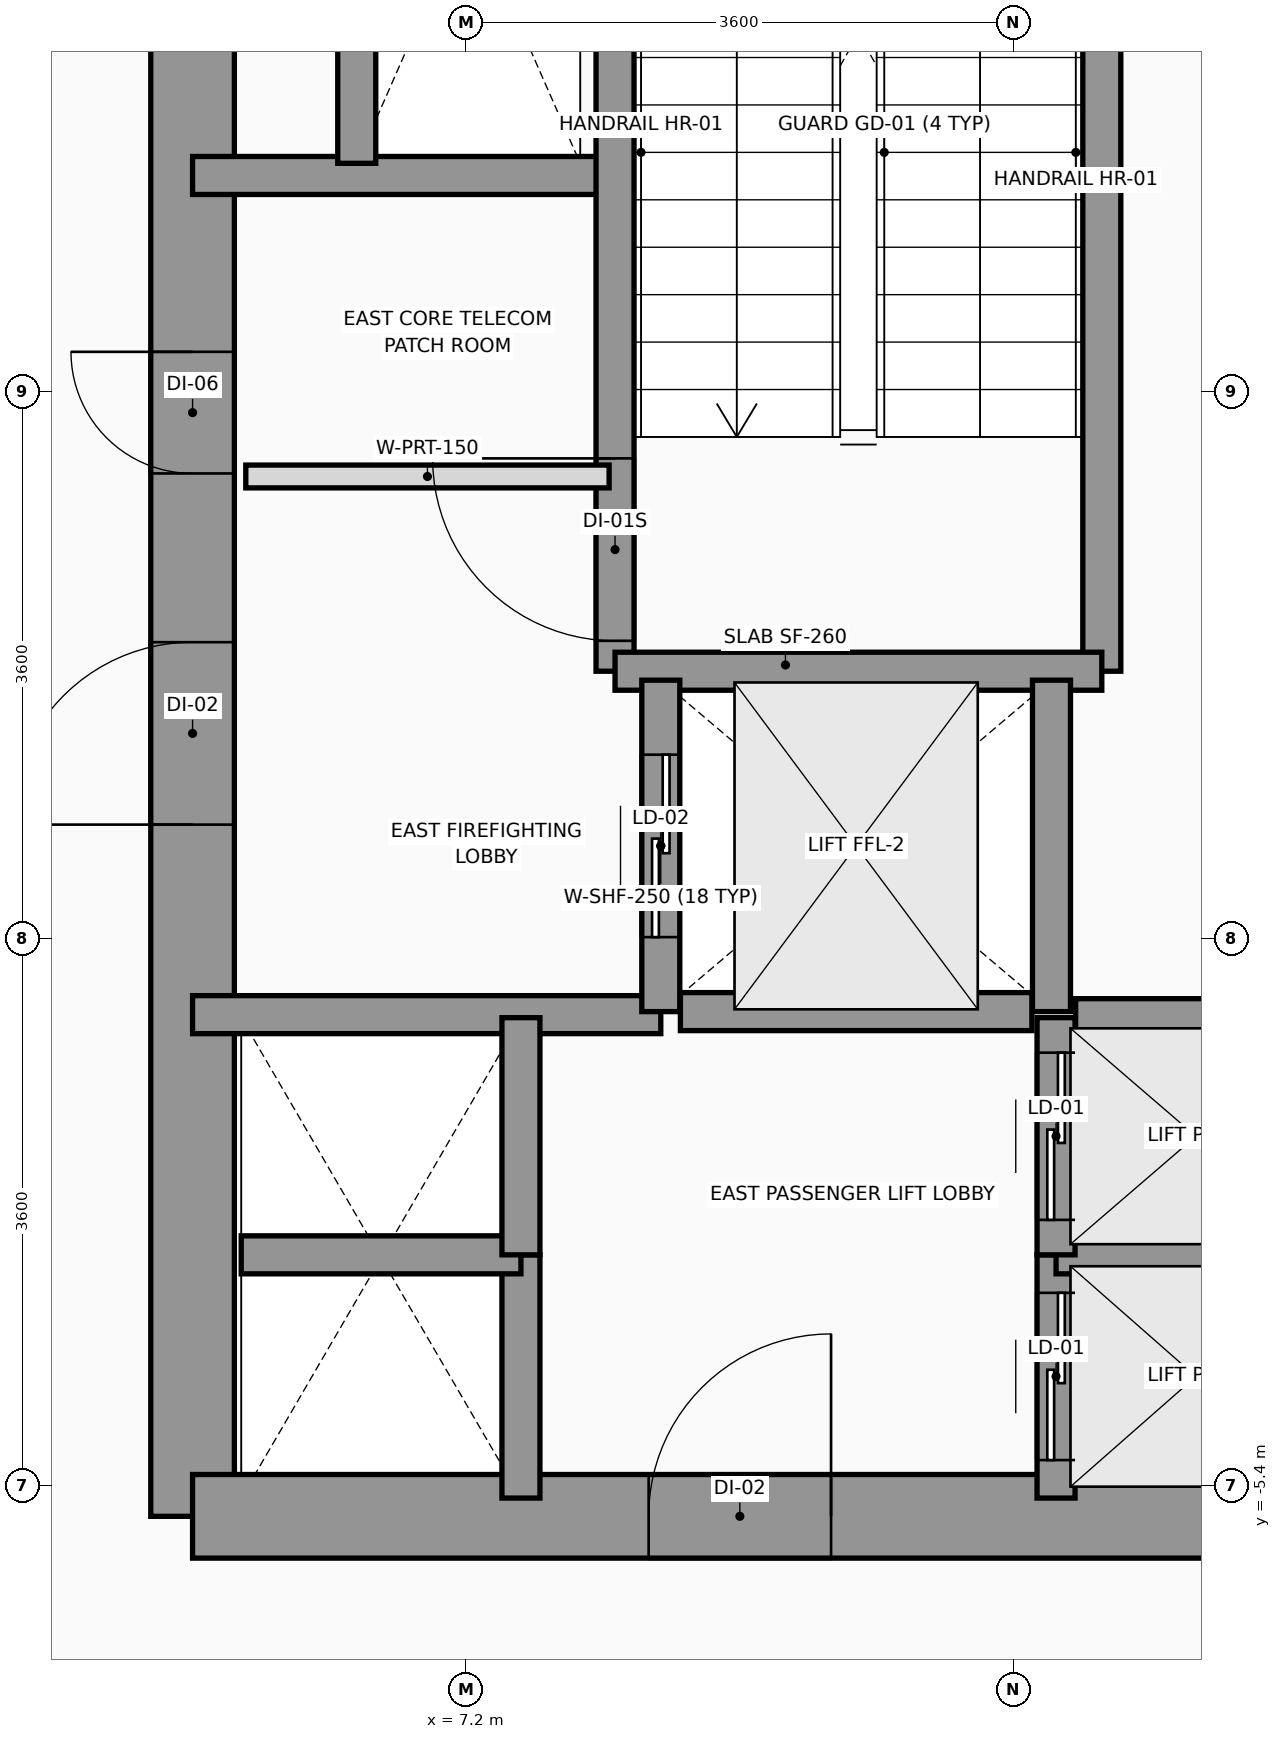
"""IFC4 building model, lengths in metres.
Left out: names, types, materials, properties, quantities, classifications, styles, units other than length and angle.
Written with IfcOpenShell. Run it as: python <this file> out.ifc"""

import sys

from ifc_helpers import new_model, si_unit, direction, frame, frame_2d, origin, place, context, subcontext, project, spatial, rectangle, extrude, source, transform, mapped, element, fill, save


model = new_model("IFC4")
c1 = context("Model", 3, precision=1e-05, world=origin(), true_north=direction((0.0, 1.0)))
c2 = subcontext(c1, "Body", "Model", "MODEL_VIEW")
j1 = project(units=[si_unit("LENGTHUNIT", "METRE"), si_unit("PLANEANGLEUNIT", "RADIAN")], contexts=[c1])
p1 = place(None, origin())
s1 = spatial("IfcSite", under=j1, at=p1, CompositionType="ELEMENT")
p2 = place(p1, origin())
s2 = spatial("IfcBuilding", under=s1, at=p2, CompositionType="ELEMENT")
p3 = place(p2, frame((0.0, 0.0, 88.4)))
s3 = spatial("IfcBuildingStorey", under=s2, at=p3, CompositionType="ELEMENT", Elevation=88.4)
p4 = place(p3, frame((5.4, -5.6, 0.0), z_axis=(0.0, 0.0, 1.0), x_axis=(0.0, 1.0, 0.0)))
e1 = element("IfcWall", 1, at=p4, inside=s3, PredefinedType="SHEAR", context=c2, shape_type="SweptSolid", body=[
    extrude(rectangle(XDim=12.5, YDim=0.55, at=frame_2d((6.25, 0.0))), origin(), (0.0, 0.0, 1.0), 4.4),
])
p5 = place(p4, frame((4.55, 0.0, 0.0)))
e2 = element("IfcOpeningElement", 2, at=p5, cuts=e1, PredefinedType="OPENING", context=c2, shape_type="SweptSolid", body=[
    extrude(rectangle(XDim=1.2, YDim=2.2, at=frame_2d((0.6, 1.1))), frame((0.0, 0.285, 0.0), z_axis=(0.0, -1.0, 0.0), x_axis=(1.0, 0.0, 0.0)), (0.0, 0.0, 1.0), 0.57),
])
p6 = place(p4, frame((6.86, 0.0, 0.0)))
e3 = element("IfcOpeningElement", 3, at=p6, cuts=e1, PredefinedType="OPENING", context=c2, shape_type="SweptSolid", body=[
    extrude(rectangle(XDim=0.8, YDim=2.1, at=frame_2d((0.4, 1.05))), frame((0.0, 0.285, 0.0), z_axis=(0.0, -1.0, 0.0), x_axis=(1.0, 0.0, 0.0)), (0.0, 0.0, 1.0), 0.57),
])
p7 = place(p3, frame((5.4, -5.6, 0.0), z_axis=(0.0, 0.0, 1.0), x_axis=(1.0, 0.0, 0.0)))
e4 = element("IfcWall", 4, at=p7, inside=s3, PredefinedType="SHEAR", context=c2, shape_type="SweptSolid", body=[
    extrude(rectangle(XDim=7.8, YDim=0.55, at=frame_2d((3.9, 0.0))), origin(), (0.0, 0.0, 1.0), 4.4),
])
p8 = place(p7, frame((3.0, 0.0, 0.0)))
e5 = element("IfcOpeningElement", 5, at=p8, cuts=e4, PredefinedType="OPENING", context=c2, shape_type="SweptSolid", body=[
    extrude(rectangle(XDim=1.2, YDim=2.2, at=frame_2d((0.6, 1.1))), frame((0.0, 0.285, 0.0), z_axis=(0.0, -1.0, 0.0), x_axis=(1.0, 0.0, 0.0)), (0.0, 0.0, 1.0), 0.57),
])
p9 = place(p3, frame((5.4, 3.22, 0.0), z_axis=(0.0, 0.0, 1.0), x_axis=(1.0, 0.0, 0.0)))
e6 = element("IfcWall", 6, at=p9, inside=s3, PredefinedType="SOLIDWALL", context=c2, shape_type="SweptSolid", body=[
    extrude(rectangle(XDim=2.78, YDim=0.25, at=frame_2d((1.39, 0.0))), origin(), (0.0, 0.0, 1.0), 4.4),
])
p10 = place(p3, frame((5.4, -2.3, 0.0), z_axis=(0.0, 0.0, 1.0), x_axis=(1.0, 0.0, 0.0)))
e7 = element("IfcWall", 7, at=p10, inside=s3, PredefinedType="SOLIDWALL", context=c2, shape_type="SweptSolid", body=[
    extrude(rectangle(XDim=3.08, YDim=0.25, at=frame_2d((1.54, 0.0))), origin(), (0.0, 0.0, 1.0), 4.4),
])
p11 = place(p3, frame((8.179, -0.041, 0.0), z_axis=(0.0, 0.0, 1.0), x_axis=(0.0, 1.0, 0.0)))
e8 = element("IfcWall", 8, at=p11, inside=s3, PredefinedType="SOLIDWALL", context=c2, shape_type="SweptSolid", body=[
    extrude(rectangle(XDim=6.941, YDim=0.25, at=frame_2d((3.47, 0.0))), origin(), (0.0, 0.0, 1.0), 4.4),
])
p12 = place(p11, frame((0.2, 0.0, 0.0)))
e9 = element("IfcOpeningElement", 9, at=p12, cuts=e8, PredefinedType="OPENING", context=c2, shape_type="SweptSolid", body=[
    extrude(rectangle(XDim=1.2, YDim=2.2, at=frame_2d((0.6, 1.1))), frame((0.0, 0.135, 0.0), z_axis=(0.0, -1.0, 0.0), x_axis=(1.0, 0.0, 0.0)), (0.0, 0.0, 1.0), 0.27),
])
p13 = place(p3, frame((11.381, -0.041, 0.0), z_axis=(0.0, 0.0, 1.0), x_axis=(0.0, 1.0, 0.0)))
e10 = element("IfcWall", 10, at=p13, inside=s3, PredefinedType="SOLIDWALL", context=c2, shape_type="SweptSolid", body=[
    extrude(rectangle(XDim=6.941, YDim=0.25, at=frame_2d((3.47, 0.0))), origin(), (0.0, 0.0, 1.0), 4.4),
])
p14 = place(p3, frame((8.179, -0.041, 0.0), z_axis=(0.0, 0.0, 1.0), x_axis=(1.0, 0.0, 0.0)))
e11 = element("IfcWall", 11, at=p14, inside=s3, PredefinedType="SOLIDWALL", context=c2, shape_type="SweptSolid", body=[
    extrude(rectangle(XDim=3.202, YDim=0.25, at=frame_2d((1.601, 0.0))), origin(), (0.0, 0.0, 1.0), 4.4),
])
p15 = place(p3, frame((8.48, -2.28, 0.0), z_axis=(0.0, 0.0, 1.0), x_axis=(0.0, 1.0, 0.0)))
e12 = element("IfcWall", 12, at=p15, inside=s3, PredefinedType="SOLIDWALL", context=c2, shape_type="SweptSolid", body=[
    extrude(rectangle(XDim=2.18, YDim=0.25, at=frame_2d((1.09, 0.0))), origin(), (0.0, 0.0, 1.0), 4.4),
])
p16 = place(p15, frame((0.49, 0.0, 0.0)))
e13 = element("IfcOpeningElement", 13, at=p16, cuts=e12, PredefinedType="OPENING", context=c2, shape_type="SweptSolid", body=[
    extrude(rectangle(XDim=1.2, YDim=2.2, at=frame_2d((0.6, 1.1))), frame((0.0, 0.135, 0.0), z_axis=(0.0, -1.0, 0.0), x_axis=(1.0, 0.0, 0.0)), (0.0, 0.0, 1.0), 0.27),
])
p17 = place(p3, frame((11.05, -2.28, 0.0), z_axis=(0.0, 0.0, 1.0), x_axis=(0.0, 1.0, 0.0)))
e14 = element("IfcWall", 14, at=p17, inside=s3, PredefinedType="SOLIDWALL", context=c2, shape_type="SweptSolid", body=[
    extrude(rectangle(XDim=2.18, YDim=0.25, at=frame_2d((1.09, 0.0))), origin(), (0.0, 0.0, 1.0), 4.4),
])
p18 = place(p3, frame((8.609, -2.28, 0.0), z_axis=(0.0, 0.0, 1.0), x_axis=(1.0, 0.0, 0.0)))
e15 = element("IfcWall", 15, at=p18, inside=s3, PredefinedType="SOLIDWALL", context=c2, shape_type="SweptSolid", body=[
    extrude(rectangle(XDim=2.312, YDim=0.25, at=frame_2d((1.156, 0.0))), origin(), (0.0, 0.0, 1.0), 4.4),
])
p19 = place(p3, frame((11.08, -5.48, 0.0), z_axis=(0.0, 0.0, 1.0), x_axis=(0.0, 1.0, 0.0)))
e16 = element("IfcWall", 16, at=p19, inside=s3, PredefinedType="SOLIDWALL", context=c2, shape_type="SweptSolid", body=[
    extrude(rectangle(XDim=1.6, YDim=0.25, at=frame_2d((0.8, 0.0))), origin(), (0.0, 0.0, 1.0), 4.4),
])
p20 = place(p19, frame((0.25, 0.0, 0.0)))
e17 = element("IfcOpeningElement", 17, at=p20, cuts=e16, PredefinedType="OPENING", context=c2, shape_type="SweptSolid", body=[
    extrude(rectangle(XDim=1.1, YDim=2.2, at=frame_2d((0.55, 1.1))), frame((0.0, 0.135, 0.0), z_axis=(0.0, -1.0, 0.0), x_axis=(1.0, 0.0, 0.0)), (0.0, 0.0, 1.0), 0.27),
])
p21 = place(p3, frame((11.08, -3.88, 0.0), z_axis=(0.0, 0.0, 1.0), x_axis=(1.0, 0.0, 0.0)))
e18 = element("IfcWall", 18, at=p21, inside=s3, PredefinedType="SOLIDWALL", context=c2, shape_type="SweptSolid", body=[
    extrude(rectangle(XDim=1.84, YDim=0.25, at=frame_2d((0.92, 0.0))), origin(), (0.0, 0.0, 1.0), 4.4),
])
p22 = place(p3, frame((11.08, -3.88, 0.0), z_axis=(0.0, 0.0, 1.0), x_axis=(0.0, 1.0, 0.0)))
e19 = element("IfcWall", 19, at=p22, inside=s3, PredefinedType="SOLIDWALL", context=c2, shape_type="SweptSolid", body=[
    extrude(rectangle(XDim=1.56, YDim=0.25, at=frame_2d((0.78, 0.0))), origin(), (0.0, 0.0, 1.0), 4.4),
])
p23 = place(p22, frame((0.23, 0.0, 0.0)))
e20 = element("IfcOpeningElement", 20, at=p23, cuts=e19, PredefinedType="OPENING", context=c2, shape_type="SweptSolid", body=[
    extrude(rectangle(XDim=1.1, YDim=2.2, at=frame_2d((0.55, 1.1))), frame((0.0, 0.135, 0.0), z_axis=(0.0, -1.0, 0.0), x_axis=(1.0, 0.0, 0.0)), (0.0, 0.0, 1.0), 0.27),
])
p24 = place(p3, frame((11.209, -2.32, 0.0), z_axis=(0.0, 0.0, 1.0), x_axis=(1.0, 0.0, 0.0)))
e21 = element("IfcWall", 21, at=p24, inside=s3, PredefinedType="SOLIDWALL", context=c2, shape_type="SweptSolid", body=[
    extrude(rectangle(XDim=1.582, YDim=0.25, at=frame_2d((0.791, 0.0))), origin(), (0.0, 0.0, 1.0), 4.4),
])
p25 = place(p3, frame((7.56, -5.48, 0.0), z_axis=(0.0, 0.0, 1.0), x_axis=(0.0, 1.0, 0.0)))
e22 = element("IfcWall", 22, at=p25, inside=s3, PredefinedType="SOLIDWALL", context=c2, shape_type="SweptSolid", body=[
    extrude(rectangle(XDim=1.6, YDim=0.25, at=frame_2d((0.8, 0.0))), origin(), (0.0, 0.0, 1.0), 4.4),
])
p26 = place(p3, frame((5.72, -3.88, 0.0), z_axis=(0.0, 0.0, 1.0), x_axis=(1.0, 0.0, 0.0)))
e23 = element("IfcWall", 23, at=p26, inside=s3, PredefinedType="SOLIDWALL", context=c2, shape_type="SweptSolid", body=[
    extrude(rectangle(XDim=1.84, YDim=0.25, at=frame_2d((0.92, 0.0))), origin(), (0.0, 0.0, 1.0), 4.4),
])
p27 = place(p3, frame((7.56, -3.88, 0.0), z_axis=(0.0, 0.0, 1.0), x_axis=(0.0, 1.0, 0.0)))
e24 = element("IfcWall", 24, at=p27, inside=s3, PredefinedType="SOLIDWALL", context=c2, shape_type="SweptSolid", body=[
    extrude(rectangle(XDim=1.56, YDim=0.25, at=frame_2d((0.78, 0.0))), origin(), (0.0, 0.0, 1.0), 4.4),
])
p28 = place(p3, frame((6.48, 3.3, 0.0), z_axis=(0.0, 0.0, 1.0), x_axis=(0.0, 1.0, 0.0)))
e25 = element("IfcWall", 25, at=p28, inside=s3, PredefinedType="SOLIDWALL", context=c2, shape_type="SweptSolid", body=[
    extrude(rectangle(XDim=1.68, YDim=0.25, at=frame_2d((0.84, 0.0))), origin(), (0.0, 0.0, 1.0), 4.4),
])
p29 = place(p3, frame((5.75, 1.24, 0.0), z_axis=(0.0, 0.0, 1.0), x_axis=(1.0, 0.0, 0.0)))
e26 = element("IfcWall", 26, at=p29, inside=s3, PredefinedType="PARTITIONING", context=c2, shape_type="SweptSolid", body=[
    extrude(rectangle(XDim=2.39, YDim=0.15, at=frame_2d((1.195, 0.0))), origin(), (0.0, 0.0, 1.0), 3.5),
])
m1 = source(origin(), c2, "Body", "SweptSolid", [
    extrude(rectangle(XDim=1.2, YDim=2.2, at=frame_2d((0.6, 1.1))), frame((0.0, 0.025, 0.0), z_axis=(0.0, -1.0, 0.0), x_axis=(1.0, 0.0, 0.0)), (0.0, 0.0, 1.0), 0.05),
])
p30 = place(p12, origin())
e27 = element("IfcDoor", 27, at=p30, inside=s3, OperationType="SINGLE_SWING_RIGHT", PredefinedType="DOOR", context=c2, shape_type="MappedRepresentation", body=[
    mapped(m1, transform((0.0, 0.0, 0.0), x_axis=(1.0, 0.0, 0.0), y_axis=(0.0, 1.0, 0.0), z_axis=(0.0, 0.0, 1.0), scale=1.0)),
])
fill(e9, e27)
p31 = place(p5, origin())
e28 = element("IfcDoor", 28, at=p31, inside=s3, OperationType="SINGLE_SWING_LEFT", PredefinedType="DOOR", context=c2, shape_type="MappedRepresentation", body=[
    mapped(m1, transform((0.0, 0.0, 0.0), x_axis=(1.0, 0.0, 0.0), y_axis=(0.0, 1.0, 0.0), z_axis=(0.0, 0.0, 1.0), scale=1.0)),
])
fill(e2, e28)
p32 = place(p8, origin())
e29 = element("IfcDoor", 29, at=p32, inside=s3, OperationType="SINGLE_SWING_RIGHT", PredefinedType="DOOR", context=c2, shape_type="MappedRepresentation", body=[
    mapped(m1, transform((0.0, 0.0, 0.0), x_axis=(1.0, 0.0, 0.0), y_axis=(0.0, 1.0, 0.0), z_axis=(0.0, 0.0, 1.0), scale=1.0)),
])
fill(e5, e29)
m2 = source(origin(), c2, "Body", "SweptSolid", [
    extrude(rectangle(XDim=0.8, YDim=2.1, at=frame_2d((0.4, 1.05))), frame((0.0, 0.025, 0.0), z_axis=(0.0, -1.0, 0.0), x_axis=(1.0, 0.0, 0.0)), (0.0, 0.0, 1.0), 0.05),
])
p33 = place(p6, origin())
e30 = element("IfcDoor", 30, at=p33, inside=s3, OperationType="SINGLE_SWING_RIGHT", PredefinedType="DOOR", context=c2, shape_type="MappedRepresentation", body=[
    mapped(m2, transform((0.0, 0.0, 0.0), x_axis=(1.0, 0.0, 0.0), y_axis=(0.0, 1.0, 0.0), z_axis=(0.0, 0.0, 1.0), scale=1.0)),
])
fill(e3, e30)
p34 = place(p16, origin())
e31 = element("IfcDoor", 31, at=p34, inside=s3, OperationType="SLIDING_TO_RIGHT", PredefinedType="DOOR", context=c2, shape_type="MappedRepresentation", body=[
    mapped(m1, transform((0.0, 0.0, 0.0), x_axis=(1.0, 0.0, 0.0), y_axis=(0.0, 1.0, 0.0), z_axis=(0.0, 0.0, 1.0), scale=1.0)),
])
fill(e13, e31)
m3 = source(origin(), c2, "Body", "SweptSolid", [
    extrude(rectangle(XDim=1.1, YDim=2.2, at=frame_2d((0.55, 1.1))), frame((0.0, 0.025, 0.0), z_axis=(0.0, -1.0, 0.0), x_axis=(1.0, 0.0, 0.0)), (0.0, 0.0, 1.0), 0.05),
])
p35 = place(p20, origin())
e32 = element("IfcDoor", 32, at=p35, inside=s3, OperationType="SLIDING_TO_LEFT", PredefinedType="DOOR", context=c2, shape_type="MappedRepresentation", body=[
    mapped(m3, transform((0.0, 0.0, 0.0), x_axis=(1.0, 0.0, 0.0), y_axis=(0.0, 1.0, 0.0), z_axis=(0.0, 0.0, 1.0), scale=1.0)),
])
fill(e17, e32)
p36 = place(p23, origin())
e33 = element("IfcDoor", 33, at=p36, inside=s3, OperationType="SLIDING_TO_LEFT", PredefinedType="DOOR", context=c2, shape_type="MappedRepresentation", body=[
    mapped(m3, transform((0.0, 0.0, 0.0), x_axis=(1.0, 0.0, 0.0), y_axis=(0.0, 1.0, 0.0), z_axis=(0.0, 0.0, 1.0), scale=1.0)),
])
fill(e20, e33)
save(model, sys.argv[1])
